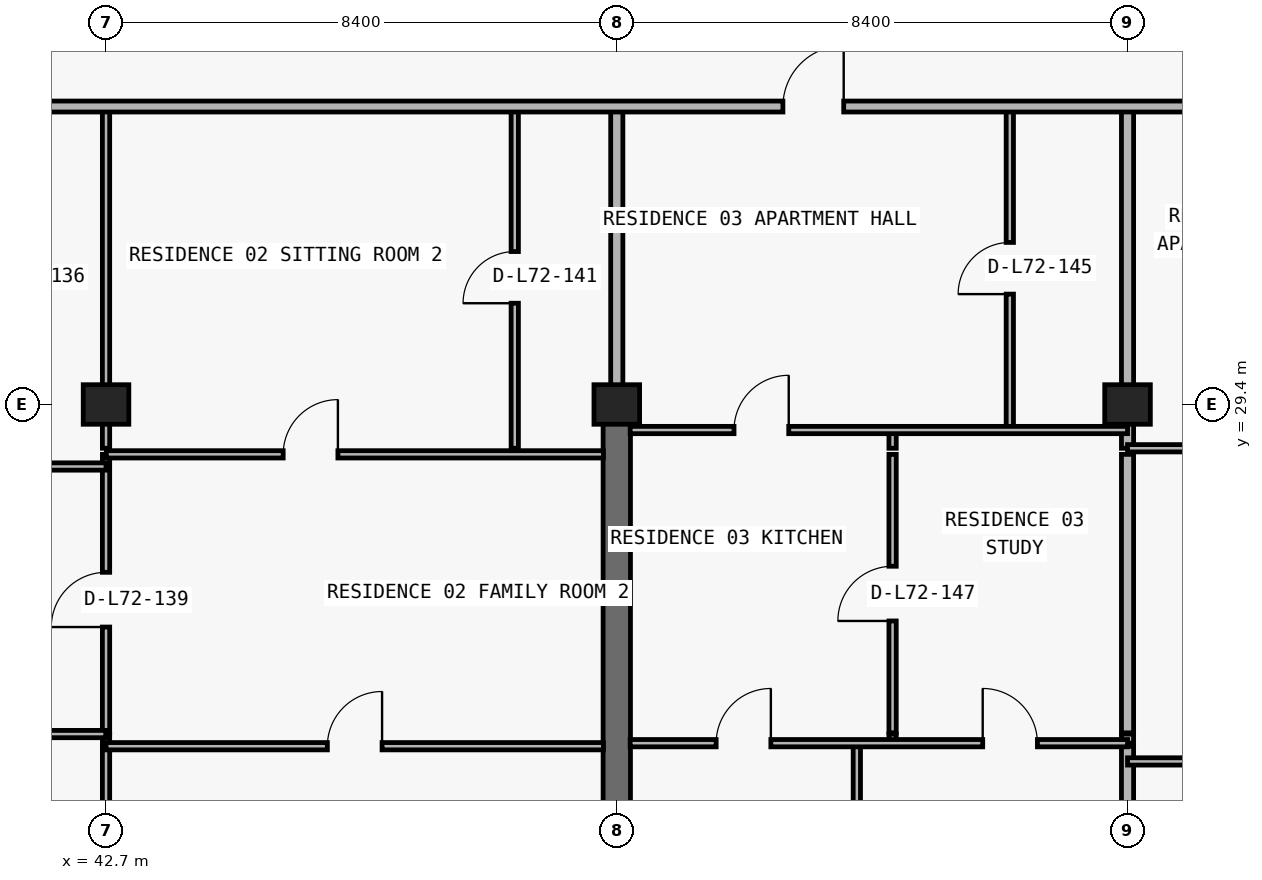
"""IFC4 building model, lengths in metres.
Left out: names, types, materials, properties, quantities, classifications, styles, units other than length and angle.
Written with IfcOpenShell. Run it as: python <this file> out.ifc"""

import sys

from ifc_helpers import new_model, si_unit, direction, frame, frame_2d, origin, origin_2d, place, context, subcontext, project, spatial, rectangle, extrude, element, fill, save


model = new_model("IFC4")
c1 = context("Model", 3, precision=1e-05, world=origin(), true_north=direction((0.0, 1.0)))
c2 = subcontext(c1, "Body", "Model", "MODEL_VIEW")
j1 = project(units=[si_unit("LENGTHUNIT", "METRE"), si_unit("PLANEANGLEUNIT", "RADIAN")], contexts=[c1])
p1 = place(None, origin())
s1 = spatial("IfcSite", under=j1, at=p1, CompositionType="ELEMENT")
p2 = place(p1, origin())
s2 = spatial("IfcBuilding", under=s1, at=p2, CompositionType="ELEMENT")
p3 = place(p2, frame((0.0, 0.0, 256.2)))
s3 = spatial("IfcBuildingStorey", under=s2, at=p3, CompositionType="ELEMENT", Elevation=256.2)
for number, where, z_axis, x_axis in (
    (1, (42.7, 29.4, 0.0), (0.0, 0.0, 1.0), (1.0, 0.0, 0.0)),
    (2, (51.1, 29.4, 0.0), (0.0, 0.0, 1.0), (1.0, 0.0, 0.0)),
    (3, (59.5, 29.4, 0.0), (0.0, 0.0, 1.0), (1.0, 0.0, 0.0)),
):
    element("IfcColumn", number, at=place(p3, frame(where, z_axis=z_axis, x_axis=x_axis)), inside=s3, PredefinedType="COLUMN", context=c2, shape_type="SweptSolid", body=[
        extrude(rectangle(XDim=0.75, YDim=0.65, at=origin_2d()), origin(), (0.0, 0.0, 1.0), 3.05),
    ])
p4 = place(p3, frame((51.1, 20.8, 0.0), z_axis=(0.0, 0.0, 1.0), x_axis=(0.0, 1.0, 0.0)))
e4 = element("IfcWall", 4, at=p4, inside=s3, PredefinedType="SHEAR", context=c2, shape_type="SweptSolid", body=[
    extrude(rectangle(XDim=8.6, YDim=0.45, at=frame_2d((4.3, 0.0))), origin(), (0.0, 0.0, 1.0), 3.05),
])
p5 = place(p3, frame((42.7, 13.34, 0.0), z_axis=(0.0, 0.0, 1.0), x_axis=(0.0, 1.0, 0.0)))
e5 = element("IfcWall", 5, at=p5, inside=s3, PredefinedType="PARTITIONING", context=c2, shape_type="SweptSolid", body=[
    extrude(rectangle(XDim=10.44, YDim=0.12, at=frame_2d((5.22, 0.0))), origin(), (0.0, 0.0, 1.0), 2.263),
])
p6 = place(p3, frame((42.7, 23.83, 0.0), z_axis=(0.0, 0.0, 1.0), x_axis=(0.0, 1.0, 0.0)))
e6 = element("IfcWall", 6, at=p6, inside=s3, PredefinedType="PARTITIONING", context=c2, shape_type="SweptSolid", body=[
    extrude(rectangle(XDim=0.15, YDim=0.12, at=frame_2d((0.075, 0.0))), origin(), (0.0, 0.0, 1.0), 2.263),
])
p7 = place(p3, frame((42.7, 24.0, 0.0), z_axis=(0.0, 0.0, 1.0), x_axis=(0.0, 1.0, 0.0)))
e7 = element("IfcWall", 7, at=p7, inside=s3, PredefinedType="PARTITIONING", context=c2, shape_type="SweptSolid", body=[
    extrude(rectangle(XDim=4.58, YDim=0.12, at=frame_2d((2.29, 0.0))), origin(), (0.0, 0.0, 1.0), 2.263),
])
p8 = place(p7, frame((1.74, 0.0, 0.0)))
e8 = element("IfcOpeningElement", 8, at=p8, cuts=e7, PredefinedType="OPENING", context=c2, shape_type="SweptSolid", body=[
    extrude(rectangle(XDim=0.9, YDim=2.15, at=frame_2d((0.45, 1.075))), frame((0.0, 0.07, 0.0), z_axis=(0.0, -1.0, 0.0), x_axis=(1.0, 0.0, 0.0)), (0.0, 0.0, 1.0), 0.14),
])
p9 = place(p3, frame((42.7, 28.68, 0.0), z_axis=(0.0, 0.0, 1.0), x_axis=(0.0, 1.0, 0.0)))
e9 = element("IfcWall", 9, at=p9, inside=s3, PredefinedType="PARTITIONING", context=c2, shape_type="SweptSolid", body=[
    extrude(rectangle(XDim=5.62, YDim=0.12, at=frame_2d((2.81, 0.0))), origin(), (0.0, 0.0, 1.0), 2.263),
])
p10 = place(p3, frame((49.422, 28.68, 0.0), z_axis=(0.0, 0.0, 1.0), x_axis=(0.0, 1.0, 0.0)))
e10 = element("IfcWall", 10, at=p10, inside=s3, PredefinedType="PARTITIONING", context=c2, shape_type="SweptSolid", body=[
    extrude(rectangle(XDim=5.62, YDim=0.12, at=frame_2d((2.81, 0.0))), origin(), (0.0, 0.0, 1.0), 3.05),
])
p11 = place(p10, frame((2.385, 0.0, 0.0)))
e11 = element("IfcOpeningElement", 11, at=p11, cuts=e10, PredefinedType="OPENING", context=c2, shape_type="SweptSolid", body=[
    extrude(rectangle(XDim=0.85, YDim=2.1, at=frame_2d((0.425, 1.05))), frame((0.0, 0.07, 0.0), z_axis=(0.0, -1.0, 0.0), x_axis=(1.0, 0.0, 0.0)), (0.0, 0.0, 1.0), 0.14),
])
p12 = place(p3, frame((51.1, 29.405, 0.0), z_axis=(0.0, 0.0, 1.0), x_axis=(0.0, 1.0, 0.0)))
e12 = element("IfcWall", 12, at=p12, inside=s3, PredefinedType="PARTITIONING", context=c2, shape_type="SweptSolid", body=[
    extrude(rectangle(XDim=4.895, YDim=0.2, at=frame_2d((2.448, 0.0))), origin(), (0.0, 0.0, 1.0), 2.335),
])
p13 = place(p3, frame((55.048, 13.34, 0.0), z_axis=(0.0, 0.0, 1.0), x_axis=(0.0, 1.0, 0.0)))
e13 = element("IfcWall", 13, at=p13, inside=s3, PredefinedType="PARTITIONING", context=c2, shape_type="SweptSolid", body=[
    extrude(rectangle(XDim=10.44, YDim=0.12, at=frame_2d((5.22, 0.0))), origin(), (0.0, 0.0, 1.0), 3.05),
])
p14 = place(p3, frame((55.636, 23.83, 0.0), z_axis=(0.0, 0.0, 1.0), x_axis=(0.0, 1.0, 0.0)))
e14 = element("IfcWall", 14, at=p14, inside=s3, PredefinedType="PARTITIONING", context=c2, shape_type="SweptSolid", body=[
    extrude(rectangle(XDim=0.15, YDim=0.12, at=frame_2d((0.075, 0.0))), origin(), (0.0, 0.0, 1.0), 3.05),
])
p15 = place(p3, frame((55.636, 24.0, 0.0), z_axis=(0.0, 0.0, 1.0), x_axis=(0.0, 1.0, 0.0)))
e15 = element("IfcWall", 15, at=p15, inside=s3, PredefinedType="PARTITIONING", context=c2, shape_type="SweptSolid", body=[
    extrude(rectangle(XDim=4.58, YDim=0.12, at=frame_2d((2.29, 0.0))), origin(), (0.0, 0.0, 1.0), 3.05),
])
p16 = place(p15, frame((1.84, 0.0, 0.0)))
e16 = element("IfcOpeningElement", 16, at=p16, cuts=e15, PredefinedType="OPENING", context=c2, shape_type="SweptSolid", body=[
    extrude(rectangle(XDim=0.9, YDim=2.15, at=frame_2d((0.45, 1.075))), frame((0.0, 0.07, 0.0), z_axis=(0.0, -1.0, 0.0), x_axis=(1.0, 0.0, 0.0)), (0.0, 0.0, 1.0), 0.14),
])
p17 = place(p3, frame((55.636, 28.68, 0.0), z_axis=(0.0, 0.0, 1.0), x_axis=(0.0, 1.0, 0.0)))
e17 = element("IfcWall", 17, at=p17, inside=s3, PredefinedType="PARTITIONING", context=c2, shape_type="SweptSolid", body=[
    extrude(rectangle(XDim=0.3, YDim=0.12, at=frame_2d((0.15, 0.0))), origin(), (0.0, 0.0, 1.0), 3.05),
])
p18 = place(p3, frame((57.564, 28.98, 0.0), z_axis=(0.0, 0.0, 1.0), x_axis=(0.0, 1.0, 0.0)))
e18 = element("IfcWall", 18, at=p18, inside=s3, PredefinedType="PARTITIONING", context=c2, shape_type="SweptSolid", body=[
    extrude(rectangle(XDim=5.32, YDim=0.12, at=frame_2d((2.66, 0.0))), origin(), (0.0, 0.0, 1.0), 3.05),
])
p19 = place(p18, frame((2.235, 0.0, 0.0)))
e19 = element("IfcOpeningElement", 19, at=p19, cuts=e18, PredefinedType="OPENING", context=c2, shape_type="SweptSolid", body=[
    extrude(rectangle(XDim=0.85, YDim=2.1, at=frame_2d((0.425, 1.05))), frame((0.0, 0.07, 0.0), z_axis=(0.0, -1.0, 0.0), x_axis=(1.0, 0.0, 0.0)), (0.0, 0.0, 1.0), 0.14),
])
p20 = place(p3, frame((59.5, 13.34, 0.0), z_axis=(0.0, 0.0, 1.0), x_axis=(0.0, 1.0, 0.0)))
e20 = element("IfcWall", 20, at=p20, inside=s3, PredefinedType="PARTITIONING", context=c2, shape_type="SweptSolid", body=[
    extrude(rectangle(XDim=10.44, YDim=0.2, at=frame_2d((5.22, 0.0))), origin(), (0.0, 0.0, 1.0), 2.263),
])
p21 = place(p3, frame((59.5, 23.83, 0.0), z_axis=(0.0, 0.0, 1.0), x_axis=(0.0, 1.0, 0.0)))
e21 = element("IfcWall", 21, at=p21, inside=s3, PredefinedType="PARTITIONING", context=c2, shape_type="SweptSolid", body=[
    extrude(rectangle(XDim=0.15, YDim=0.2, at=frame_2d((0.075, 0.0))), origin(), (0.0, 0.0, 1.0), 2.263),
])
p22 = place(p3, frame((59.5, 24.0, 0.0), z_axis=(0.0, 0.0, 1.0), x_axis=(0.0, 1.0, 0.0)))
e22 = element("IfcWall", 22, at=p22, inside=s3, PredefinedType="PARTITIONING", context=c2, shape_type="SweptSolid", body=[
    extrude(rectangle(XDim=4.58, YDim=0.2, at=frame_2d((2.29, 0.0))), origin(), (0.0, 0.0, 1.0), 2.263),
])
p23 = place(p3, frame((59.5, 28.68, 0.0), z_axis=(0.0, 0.0, 1.0), x_axis=(0.0, 1.0, 0.0)))
e23 = element("IfcWall", 23, at=p23, inside=s3, PredefinedType="PARTITIONING", context=c2, shape_type="SweptSolid", body=[
    extrude(rectangle(XDim=5.62, YDim=0.2, at=frame_2d((2.81, 0.0))), origin(), (0.0, 0.0, 1.0), 2.263),
])
p24 = place(p3, frame((59.5, 23.53, 0.0), z_axis=(0.0, 0.0, 1.0), x_axis=(1.0, 0.0, 0.0)))
e24 = element("IfcWall", 24, at=p24, inside=s3, PredefinedType="PARTITIONING", context=c2, shape_type="SweptSolid", body=[
    extrude(rectangle(XDim=6.2, YDim=0.12, at=frame_2d((3.1, 0.0))), origin(), (0.0, 0.0, 1.0), 3.05),
])
p25 = place(p24, frame((1.2, 0.0, 0.0)))
e25 = element("IfcOpeningElement", 25, at=p25, cuts=e24, PredefinedType="OPENING", context=c2, shape_type="SweptSolid", body=[
    extrude(rectangle(XDim=0.9, YDim=2.15, at=frame_2d((0.45, 1.075))), frame((0.0, 0.07, 0.0), z_axis=(0.0, -1.0, 0.0), x_axis=(1.0, 0.0, 0.0)), (0.0, 0.0, 1.0), 0.14),
])
p26 = place(p24, frame((4.3, 0.0, 0.0)))
e26 = element("IfcOpeningElement", 26, at=p26, cuts=e24, PredefinedType="OPENING", context=c2, shape_type="SweptSolid", body=[
    extrude(rectangle(XDim=0.9, YDim=2.15, at=frame_2d((0.45, 1.075))), frame((0.0, 0.07, 0.0), z_axis=(0.0, -1.0, 0.0), x_axis=(1.0, 0.0, 0.0)), (0.0, 0.0, 1.0), 0.14),
])
p27 = place(p3, frame((42.7, 23.78, 0.0), z_axis=(0.0, 0.0, 1.0), x_axis=(1.0, 0.0, 0.0)))
e27 = element("IfcWall", 27, at=p27, inside=s3, PredefinedType="PARTITIONING", context=c2, shape_type="SweptSolid", body=[
    extrude(rectangle(XDim=8.18, YDim=0.12, at=frame_2d((4.09, 0.0))), origin(), (0.0, 0.0, 1.0), 3.05),
])
p28 = place(p27, frame((3.64, 0.0, 0.0)))
e28 = element("IfcOpeningElement", 28, at=p28, cuts=e27, PredefinedType="OPENING", context=c2, shape_type="SweptSolid", body=[
    extrude(rectangle(XDim=0.9, YDim=2.15, at=frame_2d((0.45, 1.075))), frame((0.0, 0.07, 0.0), z_axis=(0.0, -1.0, 0.0), x_axis=(1.0, 0.0, 0.0)), (0.0, 0.0, 1.0), 0.14),
])
p29 = place(p3, frame((51.32, 23.83, 0.0), z_axis=(0.0, 0.0, 1.0), x_axis=(1.0, 0.0, 0.0)))
e29 = element("IfcWall", 29, at=p29, inside=s3, PredefinedType="PARTITIONING", context=c2, shape_type="SweptSolid", body=[
    extrude(rectangle(XDim=8.18, YDim=0.12, at=frame_2d((4.09, 0.0))), origin(), (0.0, 0.0, 1.0), 3.05),
])
p30 = place(p29, frame((1.414, 0.0, 0.0)))
e30 = element("IfcOpeningElement", 30, at=p30, cuts=e29, PredefinedType="OPENING", context=c2, shape_type="SweptSolid", body=[
    extrude(rectangle(XDim=0.9, YDim=2.15, at=frame_2d((0.45, 1.075))), frame((0.0, 0.07, 0.0), z_axis=(0.0, -1.0, 0.0), x_axis=(1.0, 0.0, 0.0)), (0.0, 0.0, 1.0), 0.14),
])
p31 = place(p29, frame((5.798, 0.0, 0.0)))
e31 = element("IfcOpeningElement", 31, at=p31, cuts=e29, PredefinedType="OPENING", context=c2, shape_type="SweptSolid", body=[
    extrude(rectangle(XDim=0.9, YDim=2.15, at=frame_2d((0.45, 1.075))), frame((0.0, 0.07, 0.0), z_axis=(0.0, -1.0, 0.0), x_axis=(1.0, 0.0, 0.0)), (0.0, 0.0, 1.0), 0.14),
])
p32 = place(p3, frame((35.105, 23.98, 0.0), z_axis=(0.0, 0.0, 1.0), x_axis=(1.0, 0.0, 0.0)))
e32 = element("IfcWall", 32, at=p32, inside=s3, PredefinedType="PARTITIONING", context=c2, shape_type="SweptSolid", body=[
    extrude(rectangle(XDim=7.59, YDim=0.12, at=frame_2d((3.795, 0.0))), origin(), (0.0, 0.0, 1.0), 3.05),
])
p33 = place(p32, frame((3.345, 0.0, 0.0)))
e33 = element("IfcOpeningElement", 33, at=p33, cuts=e32, PredefinedType="OPENING", context=c2, shape_type="SweptSolid", body=[
    extrude(rectangle(XDim=0.9, YDim=2.15, at=frame_2d((0.45, 1.075))), frame((0.0, 0.07, 0.0), z_axis=(0.0, -1.0, 0.0), x_axis=(1.0, 0.0, 0.0)), (0.0, 0.0, 1.0), 0.14),
])
p34 = place(p3, frame((35.1, 28.38, 0.0), z_axis=(0.0, 0.0, 1.0), x_axis=(1.0, 0.0, 0.0)))
e34 = element("IfcWall", 34, at=p34, inside=s3, PredefinedType="PARTITIONING", context=c2, shape_type="SweptSolid", body=[
    extrude(rectangle(XDim=7.6, YDim=0.12, at=frame_2d((3.8, 0.0))), origin(), (0.0, 0.0, 1.0), 3.05),
])
p35 = place(p34, frame((2.497, 0.0, 0.0)))
e35 = element("IfcOpeningElement", 35, at=p35, cuts=e34, PredefinedType="OPENING", context=c2, shape_type="SweptSolid", body=[
    extrude(rectangle(XDim=0.9, YDim=2.15, at=frame_2d((0.45, 1.075))), frame((0.0, 0.07, 0.0), z_axis=(0.0, -1.0, 0.0), x_axis=(1.0, 0.0, 0.0)), (0.0, 0.0, 1.0), 0.14),
])
p36 = place(p3, frame((42.705, 28.58, 0.0), z_axis=(0.0, 0.0, 1.0), x_axis=(1.0, 0.0, 0.0)))
e36 = element("IfcWall", 36, at=p36, inside=s3, PredefinedType="PARTITIONING", context=c2, shape_type="SweptSolid", body=[
    extrude(rectangle(XDim=8.175, YDim=0.12, at=frame_2d((4.087, 0.0))), origin(), (0.0, 0.0, 1.0), 3.05),
])
p37 = place(p36, frame((2.908, 0.0, 0.0)))
e37 = element("IfcOpeningElement", 37, at=p37, cuts=e36, PredefinedType="OPENING", context=c2, shape_type="SweptSolid", body=[
    extrude(rectangle(XDim=0.9, YDim=2.15, at=frame_2d((0.45, 1.075))), frame((0.0, 0.07, 0.0), z_axis=(0.0, -1.0, 0.0), x_axis=(1.0, 0.0, 0.0)), (0.0, 0.0, 1.0), 0.14),
])
p38 = place(p3, frame((59.5, 28.68, 0.0), z_axis=(0.0, 0.0, 1.0), x_axis=(1.0, 0.0, 0.0)))
e38 = element("IfcWall", 38, at=p38, inside=s3, PredefinedType="PARTITIONING", context=c2, shape_type="SweptSolid", body=[
    extrude(rectangle(XDim=6.2, YDim=0.12, at=frame_2d((3.1, 0.0))), origin(), (0.0, 0.0, 1.0), 3.05),
])
p39 = place(p38, frame((1.796, 0.0, 0.0)))
e39 = element("IfcOpeningElement", 39, at=p39, cuts=e38, PredefinedType="OPENING", context=c2, shape_type="SweptSolid", body=[
    extrude(rectangle(XDim=0.9, YDim=2.15, at=frame_2d((0.45, 1.075))), frame((0.0, 0.07, 0.0), z_axis=(0.0, -1.0, 0.0), x_axis=(1.0, 0.0, 0.0)), (0.0, 0.0, 1.0), 0.14),
])
p40 = place(p3, frame((51.32, 28.98, 0.0), z_axis=(0.0, 0.0, 1.0), x_axis=(1.0, 0.0, 0.0)))
e40 = element("IfcWall", 40, at=p40, inside=s3, PredefinedType="PARTITIONING", context=c2, shape_type="SweptSolid", body=[
    extrude(rectangle(XDim=8.18, YDim=0.12, at=frame_2d((4.09, 0.0))), origin(), (0.0, 0.0, 1.0), 3.05),
])
p41 = place(p40, frame((1.708, 0.0, 0.0)))
e41 = element("IfcOpeningElement", 41, at=p41, cuts=e40, PredefinedType="OPENING", context=c2, shape_type="SweptSolid", body=[
    extrude(rectangle(XDim=0.9, YDim=2.15, at=frame_2d((0.45, 1.075))), frame((0.0, 0.07, 0.0), z_axis=(0.0, -1.0, 0.0), x_axis=(1.0, 0.0, 0.0)), (0.0, 0.0, 1.0), 0.14),
])
p42 = place(p3, frame((12.105, 34.3, 0.0), z_axis=(0.0, 0.0, 1.0), x_axis=(1.0, 0.0, 0.0)))
e42 = element("IfcWall", 42, at=p42, inside=s3, PredefinedType="PARTITIONING", context=c2, shape_type="SweptSolid", body=[
    extrude(rectangle(XDim=53.595, YDim=0.18, at=frame_2d((26.797, 0.0))), origin(), (0.0, 0.0, 1.0), 3.05),
])
p43 = place(p42, frame((1.661, 0.0, 0.0)))
e43 = element("IfcOpeningElement", 43, at=p43, cuts=e42, PredefinedType="OPENING", context=c2, shape_type="SweptSolid", body=[
    extrude(rectangle(XDim=1.0, YDim=2.2, at=frame_2d((0.5, 1.1))), frame((0.0, 0.1, 0.0), z_axis=(0.0, -1.0, 0.0), x_axis=(1.0, 0.0, 0.0)), (0.0, 0.0, 1.0), 0.2),
])
p44 = place(p42, frame((17.438, 0.0, 0.0)))
e44 = element("IfcOpeningElement", 44, at=p44, cuts=e42, PredefinedType="OPENING", context=c2, shape_type="SweptSolid", body=[
    extrude(rectangle(XDim=1.0, YDim=2.2, at=frame_2d((0.5, 1.1))), frame((0.0, 0.1, 0.0), z_axis=(0.0, -1.0, 0.0), x_axis=(1.0, 0.0, 0.0)), (0.0, 0.0, 1.0), 0.2),
])
p45 = place(p42, frame((41.727, 0.0, 0.0)))
e45 = element("IfcOpeningElement", 45, at=p45, cuts=e42, PredefinedType="OPENING", context=c2, shape_type="SweptSolid", body=[
    extrude(rectangle(XDim=1.0, YDim=2.2, at=frame_2d((0.5, 1.1))), frame((0.0, 0.1, 0.0), z_axis=(0.0, -1.0, 0.0), x_axis=(1.0, 0.0, 0.0)), (0.0, 0.0, 1.0), 0.2),
])
p46 = place(p42, frame((49.141, 0.0, 0.0)))
e46 = element("IfcOpeningElement", 46, at=p46, cuts=e42, PredefinedType="OPENING", context=c2, shape_type="SweptSolid", body=[
    extrude(rectangle(XDim=1.0, YDim=2.2, at=frame_2d((0.5, 1.1))), frame((0.0, 0.1, 0.0), z_axis=(0.0, -1.0, 0.0), x_axis=(1.0, 0.0, 0.0)), (0.0, 0.0, 1.0), 0.2),
])
p47 = place(p8, origin())
e47 = element("IfcDoor", 47, at=p47, inside=s3, OperationType="SINGLE_SWING_LEFT", PredefinedType="DOOR", context=c2, shape_type="SweptSolid", body=[
    extrude(rectangle(XDim=0.9, YDim=2.15, at=frame_2d((0.45, 1.075))), frame((0.0, 0.025, 0.0), z_axis=(0.0, -1.0, 0.0), x_axis=(1.0, 0.0, 0.0)), (0.0, 0.0, 1.0), 0.05),
])
fill(e8, e47)
p48 = place(p37, origin())
e48 = element("IfcDoor", 48, at=p48, inside=s3, OperationType="SINGLE_SWING_RIGHT", PredefinedType="DOOR", context=c2, shape_type="SweptSolid", body=[
    extrude(rectangle(XDim=0.9, YDim=2.15, at=frame_2d((0.45, 1.075))), frame((0.0, 0.025, 0.0), z_axis=(0.0, -1.0, 0.0), x_axis=(1.0, 0.0, 0.0)), (0.0, 0.0, 1.0), 0.05),
])
fill(e37, e48)
p49 = place(p11, origin())
e49 = element("IfcDoor", 49, at=p49, inside=s3, OperationType="SINGLE_SWING_LEFT", PredefinedType="DOOR", context=c2, shape_type="SweptSolid", body=[
    extrude(rectangle(XDim=0.85, YDim=2.1, at=frame_2d((0.425, 1.05))), frame((0.0, 0.025, 0.0), z_axis=(0.0, -1.0, 0.0), x_axis=(1.0, 0.0, 0.0)), (0.0, 0.0, 1.0), 0.05),
])
fill(e11, e49)
p50 = place(p28, origin())
e50 = element("IfcDoor", 50, at=p50, inside=s3, OperationType="SINGLE_SWING_RIGHT", PredefinedType="DOOR", context=c2, shape_type="SweptSolid", body=[
    extrude(rectangle(XDim=0.9, YDim=2.15, at=frame_2d((0.45, 1.075))), frame((0.0, 0.025, 0.0), z_axis=(0.0, -1.0, 0.0), x_axis=(1.0, 0.0, 0.0)), (0.0, 0.0, 1.0), 0.05),
])
fill(e28, e50)
p51 = place(p45, origin())
e51 = element("IfcDoor", 51, at=p51, inside=s3, OperationType="SINGLE_SWING_RIGHT", PredefinedType="DOOR", context=c2, shape_type="SweptSolid", body=[
    extrude(rectangle(XDim=1.0, YDim=2.2, at=frame_2d((0.5, 1.1))), frame((0.0, 0.025, 0.0), z_axis=(0.0, -1.0, 0.0), x_axis=(1.0, 0.0, 0.0)), (0.0, 0.0, 1.0), 0.05),
])
fill(e45, e51)
p52 = place(p19, origin())
e52 = element("IfcDoor", 52, at=p52, inside=s3, OperationType="SINGLE_SWING_LEFT", PredefinedType="DOOR", context=c2, shape_type="SweptSolid", body=[
    extrude(rectangle(XDim=0.85, YDim=2.1, at=frame_2d((0.425, 1.05))), frame((0.0, 0.025, 0.0), z_axis=(0.0, -1.0, 0.0), x_axis=(1.0, 0.0, 0.0)), (0.0, 0.0, 1.0), 0.05),
])
fill(e19, e52)
p53 = place(p41, origin())
e53 = element("IfcDoor", 53, at=p53, inside=s3, OperationType="SINGLE_SWING_RIGHT", PredefinedType="DOOR", context=c2, shape_type="SweptSolid", body=[
    extrude(rectangle(XDim=0.9, YDim=2.15, at=frame_2d((0.45, 1.075))), frame((0.0, 0.025, 0.0), z_axis=(0.0, -1.0, 0.0), x_axis=(1.0, 0.0, 0.0)), (0.0, 0.0, 1.0), 0.05),
])
fill(e41, e53)
p54 = place(p16, origin())
e54 = element("IfcDoor", 54, at=p54, inside=s3, OperationType="SINGLE_SWING_LEFT", PredefinedType="DOOR", context=c2, shape_type="SweptSolid", body=[
    extrude(rectangle(XDim=0.9, YDim=2.15, at=frame_2d((0.45, 1.075))), frame((0.0, 0.025, 0.0), z_axis=(0.0, -1.0, 0.0), x_axis=(1.0, 0.0, 0.0)), (0.0, 0.0, 1.0), 0.05),
])
fill(e16, e54)
p55 = place(p30, origin())
e55 = element("IfcDoor", 55, at=p55, inside=s3, OperationType="SINGLE_SWING_RIGHT", PredefinedType="DOOR", context=c2, shape_type="SweptSolid", body=[
    extrude(rectangle(XDim=0.9, YDim=2.15, at=frame_2d((0.45, 1.075))), frame((0.0, 0.025, 0.0), z_axis=(0.0, -1.0, 0.0), x_axis=(1.0, 0.0, 0.0)), (0.0, 0.0, 1.0), 0.05),
])
fill(e30, e55)
p56 = place(p31, origin())
e56 = element("IfcDoor", 56, at=p56, inside=s3, OperationType="SINGLE_SWING_LEFT", PredefinedType="DOOR", context=c2, shape_type="SweptSolid", body=[
    extrude(rectangle(XDim=0.9, YDim=2.15, at=frame_2d((0.45, 1.075))), frame((0.0, 0.025, 0.0), z_axis=(0.0, -1.0, 0.0), x_axis=(1.0, 0.0, 0.0)), (0.0, 0.0, 1.0), 0.05),
])
fill(e31, e56)
save(model, sys.argv[1])
